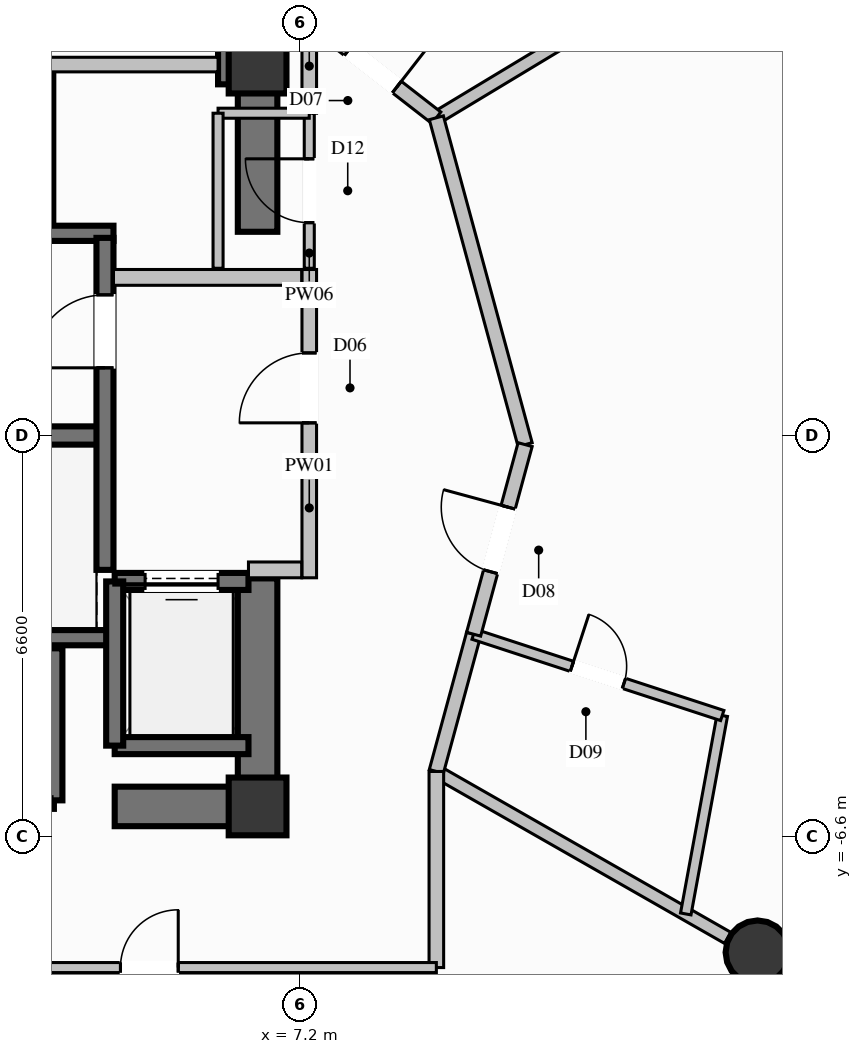
"""IFC4 building model, lengths in metres.
Left out: names, types, materials, properties, quantities, classifications, styles, units other than length and angle.
Written with IfcOpenShell. Run it as: python <this file> out.ifc"""

import sys

from ifc_helpers import new_model, si_unit, direction, frame, frame_2d, origin, origin_2d, place, context, subcontext, project, spatial, rectangle, circle, extrude, element, fill, save


model = new_model("IFC4")
c1 = context("Model", 3, precision=1e-05, world=origin(), true_north=direction((0.0, 1.0)))
c2 = subcontext(c1, "Body", "Model", "MODEL_VIEW")
j1 = project(units=[si_unit("LENGTHUNIT", "METRE"), si_unit("PLANEANGLEUNIT", "RADIAN")], contexts=[c1])
p1 = place(None, origin())
s1 = spatial("IfcSite", under=j1, at=p1, CompositionType="ELEMENT")
p2 = place(p1, origin())
s2 = spatial("IfcBuilding", under=s1, at=p2, CompositionType="ELEMENT")
p3 = place(p2, frame((0.0, 0.0, 149.4)))
s3 = spatial("IfcBuildingStorey", under=s2, at=p3, CompositionType="ELEMENT", Elevation=149.4)
for number, where, z_axis, x_axis in (
    (1, (6.5, -6.1, 0.0), (0.0, 0.0, 1.0), (1.0, 0.0, 0.0)),
    (2, (6.5, 6.1, 0.0), (0.0, 0.0, 1.0), (1.0, 0.0, 0.0)),
):
    element("IfcColumn", number, at=place(p3, frame(where, z_axis=z_axis, x_axis=x_axis)), inside=s3, PredefinedType="COLUMN", context=c2, shape_type="SweptSolid", body=[
        extrude(rectangle(XDim=0.95, YDim=0.95, at=origin_2d()), origin(), (0.0, 0.0, 1.0), 3.6),
    ])
p4 = place(p3, frame((-3.99, 0.0, 0.0), z_axis=(0.0, 0.0, 1.0), x_axis=(1.0, 0.0, 0.0)))
e3 = element("IfcWall", 3, at=p4, inside=s3, PredefinedType="SHEAR", context=c2, shape_type="SweptSolid", body=[
    extrude(rectangle(XDim=7.98, YDim=0.3, at=frame_2d((3.99, 0.0))), origin(), (0.0, 0.0, 1.0), 3.6),
])
for number, where, z_axis, x_axis in (
    (4, (-4.13, -3.325, 0.0), (0.0, 0.0, 1.0), (1.0, 0.0, 0.0)),
    (5, (-4.13, 3.325, 0.0), (0.0, 0.0, 1.0), (1.0, 0.0, 0.0)),
):
    element("IfcWall", number, at=place(p3, frame(where, z_axis=z_axis, x_axis=x_axis)), inside=s3, PredefinedType="SOLIDWALL", context=c2, shape_type="SweptSolid", body=[
        extrude(rectangle(XDim=8.26, YDim=0.25, at=frame_2d((4.13, 0.0))), origin(), (0.0, 0.0, 1.0), 3.6),
    ])
p5 = place(p3, frame((4.15, -6.1, 0.0), z_axis=(0.0, 0.0, 1.0), x_axis=(1.0, 0.0, 0.0)))
e6 = element("IfcWall", 6, at=p5, inside=s3, PredefinedType="SHEAR", context=c2, shape_type="SweptSolid", body=[
    extrude(rectangle(XDim=2.025, YDim=0.65, at=frame_2d((1.013, 0.0))), origin(), (0.0, 0.0, 1.0), 3.6),
])
p6 = place(p3, frame((5.85, 6.1, 0.0), z_axis=(0.0, 0.0, 1.0), x_axis=(1.0, 0.0, 0.0)))
e7 = element("IfcWall", 7, at=p6, inside=s3, PredefinedType="SHEAR", context=c2, shape_type="SweptSolid", body=[
    extrude(rectangle(XDim=0.325, YDim=0.65, at=frame_2d((0.163, 0.0))), origin(), (0.0, 0.0, 1.0), 3.6),
])
p7 = place(p3, frame((6.5, -6.425, 0.0), z_axis=(0.0, 0.0, 1.0), x_axis=(0.0, 1.0, 0.0)))
e8 = element("IfcWall", 8, at=p7, inside=s3, PredefinedType="SHEAR", context=c2, shape_type="SweptSolid", body=[
    extrude(rectangle(XDim=4.075, YDim=0.65, at=frame_2d((2.038, 0.0))), origin(), (0.0, 0.0, 1.0), 3.6),
])
p8 = place(p3, frame((6.5, 3.35, 0.0), z_axis=(0.0, 0.0, 1.0), x_axis=(0.0, 1.0, 0.0)))
e9 = element("IfcWall", 9, at=p8, inside=s3, PredefinedType="SHEAR", context=c2, shape_type="SweptSolid", body=[
    extrude(rectangle(XDim=3.075, YDim=0.65, at=frame_2d((1.538, 0.0))), origin(), (0.0, 0.0, 1.0), 3.6),
])
p9 = place(p3, frame((14.722, -8.5, 0.0), z_axis=(0.0, 0.0, 1.0), x_axis=(1.0, 0.0, 0.0)))
e10 = element("IfcColumn", 10, at=p9, inside=s3, PredefinedType="COLUMN", context=c2, shape_type="SweptSolid", body=[
    extrude(circle(Radius=0.525, at=origin_2d()), origin(), (0.0, 0.0, 1.0), 3.6),
])
p10 = place(p3, frame((1.05, -6.0, 0.0), z_axis=(0.0, 0.0, 1.0), x_axis=(1.0, 0.0, 0.0)))
e11 = element("IfcWall", 11, at=p10, inside=s3, PredefinedType="SOLIDWALL", context=c2, shape_type="SweptSolid", body=[
    extrude(rectangle(XDim=2.1, YDim=0.28, at=frame_2d((1.05, 0.0))), origin(), (0.0, 0.0, 1.0), 3.35),
])
p11 = place(p10, frame((0.5, 0.0, 0.0)))
e12 = element("IfcOpeningElement", 12, at=p11, cuts=e11, PredefinedType="OPENING", context=c2, shape_type="SweptSolid", body=[
    extrude(rectangle(XDim=1.1, YDim=2.2, at=frame_2d((0.55, 1.1))), frame((0.0, 0.15, 0.0), z_axis=(0.0, -1.0, 0.0), x_axis=(1.0, 0.0, 0.0)), (0.0, 0.0, 1.0), 0.3),
])
for number, where, z_axis, x_axis in (
    (13, (3.15, -6.0, 0.0), (0.0, 0.0, 1.0), (0.0, 1.0, 0.0)),
    (14, (3.0, 3.5, 0.0), (0.0, 0.0, 1.0), (0.0, 1.0, 0.0)),
):
    element("IfcWall", number, at=place(p3, frame(where, z_axis=z_axis, x_axis=x_axis)), inside=s3, PredefinedType="SOLIDWALL", context=c2, shape_type="SweptSolid", body=[
        extrude(rectangle(XDim=2.5, YDim=0.28, at=frame_2d((1.25, 0.0))), origin(), (0.0, 0.0, 1.0), 3.35),
    ])
p12 = place(p3, frame((4.15, -5.1, 0.0), z_axis=(0.0, 0.0, 1.0), x_axis=(1.0, 0.0, 0.0)))
e15 = element("IfcWall", 15, at=p12, inside=s3, PredefinedType="SOLIDWALL", context=c2, shape_type="SweptSolid", body=[
    extrude(rectangle(XDim=2.2, YDim=0.28, at=frame_2d((1.1, 0.0))), origin(), (0.0, 0.0, 1.0), 3.35),
])
p13 = place(p3, frame((6.35, -2.4, 0.0), z_axis=(0.0, 0.0, 1.0), x_axis=(-1.0, 0.0, 0.0)))
e16 = element("IfcWall", 16, at=p13, inside=s3, PredefinedType="SOLIDWALL", context=c2, shape_type="SweptSolid", body=[
    extrude(rectangle(XDim=2.2, YDim=0.28, at=frame_2d((1.1, 0.0))), origin(), (0.0, 0.0, 1.0), 3.35),
])
p14 = place(p13, frame((0.5, 0.0, 0.0)))
e17 = element("IfcOpeningElement", 17, at=p14, cuts=e16, PredefinedType="OPENING", context=c2, shape_type="SweptSolid", body=[
    extrude(rectangle(XDim=1.2, YDim=2.2, at=frame_2d((0.6, 1.1))), frame((0.0, 0.15, 0.0), z_axis=(0.0, -1.0, 0.0), x_axis=(1.0, 0.0, 0.0)), (0.0, 0.0, 1.0), 0.3),
])
p15 = place(p3, frame((4.15, -2.4, 0.0), z_axis=(0.0, 0.0, 1.0), x_axis=(0.0, -1.0, 0.0)))
e18 = element("IfcWall", 18, at=p15, inside=s3, PredefinedType="SOLIDWALL", context=c2, shape_type="SweptSolid", body=[
    extrude(rectangle(XDim=2.7, YDim=0.28, at=frame_2d((1.35, 0.0))), origin(), (0.0, 0.0, 1.0), 3.35),
])
p16 = place(p3, frame((3.99, -2.21, 0.0), z_axis=(0.0, 0.0, 1.0), x_axis=(0.0, 1.0, 0.0)))
e19 = element("IfcWall", 19, at=p16, inside=s3, PredefinedType="SOLIDWALL", context=c2, shape_type="SweptSolid", body=[
    extrude(rectangle(XDim=5.46, YDim=0.28, at=frame_2d((2.73, 0.0))), origin(), (0.0, 0.0, 1.0), 3.35),
])
p17 = place(p16, frame((3.323, 0.0, 0.0)))
e20 = element("IfcOpeningElement", 20, at=p17, cuts=e19, PredefinedType="OPENING", context=c2, shape_type="SweptSolid", body=[
    extrude(rectangle(XDim=1.2, YDim=2.2, at=frame_2d((0.6, 1.1))), frame((0.0, 0.15, 0.0), z_axis=(0.0, -1.0, 0.0), x_axis=(1.0, 0.0, 0.0)), (0.0, 0.0, 1.0), 0.3),
])
p18 = place(p3, frame((7.35, -2.34, 0.0), z_axis=(0.0, 0.0, 1.0), x_axis=(0.0, 1.0, 0.0)))
e21 = element("IfcWall", 21, at=p18, inside=s3, PredefinedType="PARTITIONING", context=c2, shape_type="SweptSolid", body=[
    extrude(rectangle(XDim=5.07, YDim=0.24, at=frame_2d((2.535, 0.0))), origin(), (0.0, 0.0, 1.0), 2.435),
])
p19 = place(p18, frame((2.548, 0.0, 0.0)))
e22 = element("IfcOpeningElement", 22, at=p19, cuts=e21, PredefinedType="OPENING", context=c2, shape_type="SweptSolid", body=[
    extrude(rectangle(XDim=1.15, YDim=2.2, at=frame_2d((0.575, 1.1))), frame((0.0, 0.13, 0.0), z_axis=(0.0, -1.0, 0.0), x_axis=(1.0, 0.0, 0.0)), (0.0, 0.0, 1.0), 0.26),
])
p20 = place(p3, frame((6.35, -2.21, 0.0), z_axis=(0.0, 0.0, 1.0), x_axis=(1.0, 0.0, 0.0)))
e23 = element("IfcWall", 23, at=p20, inside=s3, PredefinedType="PARTITIONING", context=c2, shape_type="SweptSolid", body=[
    extrude(rectangle(XDim=0.875, YDim=0.26, at=frame_2d((0.438, 0.0))), origin(), (0.0, 0.0, 1.0), 3.35),
])
p21 = place(p3, frame((4.13, 2.6, 0.0), z_axis=(0.0, 0.0, 1.0), x_axis=(1.0, 0.0, 0.0)))
e24 = element("IfcWall", 24, at=p21, inside=s3, PredefinedType="PARTITIONING", context=c2, shape_type="SweptSolid", body=[
    extrude(rectangle(XDim=3.095, YDim=0.26, at=frame_2d((1.548, 0.0))), origin(), (0.0, 0.0, 1.0), 3.35),
])
p22 = place(p3, frame((7.35, 5.3, 0.0), z_axis=(0.0, 0.0, 1.0), x_axis=(0.0, 1.0, 0.0)))
e25 = element("IfcWall", 25, at=p22, inside=s3, PredefinedType="PARTITIONING", context=c2, shape_type="SweptSolid", body=[
    extrude(rectangle(XDim=1.55, YDim=0.24, at=frame_2d((0.775, 0.0))), origin(), (0.0, 0.0, 1.0), 2.435),
])
p23 = place(p3, frame((3.0, 6.1, 0.0), z_axis=(0.0, 0.0, 1.0), x_axis=(1.0, 0.0, 0.0)))
e26 = element("IfcWall", 26, at=p23, inside=s3, PredefinedType="PARTITIONING", context=c2, shape_type="SweptSolid", body=[
    extrude(rectangle(XDim=2.85, YDim=0.24, at=frame_2d((1.425, 0.0))), origin(), (0.0, 0.0, 1.0), 2.435),
])
p24 = place(p3, frame((7.35, 2.75, 0.0), z_axis=(0.0, 0.0, 1.0), x_axis=(0.0, 1.0, 0.0)))
e27 = element("IfcWall", 27, at=p24, inside=s3, PredefinedType="PARTITIONING", context=c2, shape_type="SweptSolid", body=[
    extrude(rectangle(XDim=2.55, YDim=0.165, at=frame_2d((1.275, 0.0))), origin(), (0.0, 0.0, 1.0), 3.35),
])
p25 = place(p24, frame((0.75, 0.0, 0.0)))
e28 = element("IfcOpeningElement", 28, at=p25, cuts=e27, PredefinedType="OPENING", context=c2, shape_type="SweptSolid", body=[
    extrude(rectangle(XDim=1.05, YDim=2.15, at=frame_2d((0.525, 1.075))), frame((0.0, 0.093, 0.0), z_axis=(0.0, -1.0, 0.0), x_axis=(1.0, 0.0, 0.0)), (0.0, 0.0, 1.0), 0.185),
])
p26 = place(p3, frame((7.35, 5.3, 0.0), z_axis=(0.0, 0.0, 1.0), x_axis=(-1.0, 0.0, 0.0)))
e29 = element("IfcWall", 29, at=p26, inside=s3, PredefinedType="PARTITIONING", context=c2, shape_type="SweptSolid", body=[
    extrude(rectangle(XDim=1.5, YDim=0.165, at=frame_2d((0.75, 0.0))), origin(), (0.0, 0.0, 1.0), 2.435),
])
p27 = place(p3, frame((5.85, 5.3, 0.0), z_axis=(0.0, 0.0, 1.0), x_axis=(0.0, -1.0, 0.0)))
e30 = element("IfcWall", 30, at=p27, inside=s3, PredefinedType="PARTITIONING", context=c2, shape_type="SweptSolid", body=[
    extrude(rectangle(XDim=2.55, YDim=0.165, at=frame_2d((1.275, 0.0))), origin(), (0.0, 0.0, 1.0), 2.435),
])
p28 = place(p3, frame((9.44, 5.225, 0.0), z_axis=(0.0, 0.0, 1.0), x_axis=(0.856412995276, 0.516291372698, 0.0)))
e31 = element("IfcWall", 31, at=p28, inside=s3, PredefinedType="PARTITIONING", context=c2, shape_type="SweptSolid", body=[
    extrude(rectangle(XDim=5.675, YDim=0.21, at=frame_2d((2.837, 0.0))), origin(), (0.0, 0.0, 1.0), 2.717),
])
p29 = place(p3, frame((9.44, -5.525, 0.0), z_axis=(0.0, 0.0, 1.0), x_axis=(0.868338411793, -0.495972179265, 0.0)))
e32 = element("IfcWall", 32, at=p29, inside=s3, PredefinedType="PARTITIONING", context=c2, shape_type="SweptSolid", body=[
    extrude(rectangle(XDim=5.519, YDim=0.21, at=frame_2d((2.759, 0.0))), origin(), (0.0, 0.0, 1.0), 2.717),
])
p30 = place(p3, frame((15.176, -8.801, 0.0), z_axis=(0.0, 0.0, 1.0), x_axis=(0.868298798987, -0.496041526162, 0.0)))
e33 = element("IfcWall", 33, at=p30, inside=s3, PredefinedType="PARTITIONING", context=c2, shape_type="SweptSolid", body=[
    extrude(rectangle(XDim=7.288, YDim=0.21, at=frame_2d((3.644, 0.0))), origin(), (0.0, 0.0, 1.0), 3.35),
])
p31 = place(p3, frame((7.35, 6.85, 0.0), z_axis=(0.0, 0.0, 1.0), x_axis=(0.789431664708, -0.613838453306, 0.0)))
e34 = element("IfcWall", 34, at=p31, inside=s3, PredefinedType="PARTITIONING", context=c2, shape_type="SweptSolid", body=[
    extrude(rectangle(XDim=2.647, YDim=0.24, at=frame_2d((1.324, 0.0))), origin(), (0.0, 0.0, 1.0), 3.35),
])
p32 = place(p31, frame((0.824, 0.0, 0.0)))
e35 = element("IfcOpeningElement", 35, at=p32, cuts=e34, PredefinedType="OPENING", context=c2, shape_type="SweptSolid", body=[
    extrude(rectangle(XDim=1.0, YDim=2.2, at=frame_2d((0.5, 1.1))), frame((0.0, 0.13, 0.0), z_axis=(0.0, -1.0, 0.0), x_axis=(1.0, 0.0, 0.0)), (0.0, 0.0, 1.0), 0.26),
])
p33 = place(p3, frame((9.44, -5.525, 0.0), z_axis=(0.0, 0.0, 1.0), x_axis=(0.262136756532, 0.965030735715, 0.0)))
e36 = element("IfcWall", 36, at=p33, inside=s3, PredefinedType="PARTITIONING", context=c2, shape_type="SweptSolid", body=[
    extrude(rectangle(XDim=2.339, YDim=0.24, at=frame_2d((1.169, 0.0))), origin(), (0.0, 0.0, 1.0), 3.35),
])
p34 = place(p3, frame((13.542, -7.868, 0.0), z_axis=(0.0, 0.0, 1.0), x_axis=(0.180879603069, 0.983505246144, 0.0)))
e37 = element("IfcWall", 37, at=p34, inside=s3, PredefinedType="PLUMBINGWALL", context=c2, shape_type="SweptSolid", body=[
    extrude(rectangle(XDim=3.318, YDim=0.175, at=frame_2d((1.659, 0.0))), origin(), (0.0, 0.0, 1.0), 3.35),
])
p35 = place(p3, frame((10.053, -3.268, 0.0), z_axis=(0.0, 0.0, 1.0), x_axis=(0.950489200724, -0.310757589299, 0.0)))
e38 = element("IfcWall", 38, at=p35, inside=s3, PredefinedType="PLUMBINGWALL", context=c2, shape_type="SweptSolid", body=[
    extrude(rectangle(XDim=4.302, YDim=0.175, at=frame_2d((2.151, 0.0))), origin(), (0.0, 0.0, 1.0), 3.35),
])
p36 = place(p35, frame((1.701, 0.0, 0.0)))
e39 = element("IfcOpeningElement", 39, at=p36, cuts=e38, PredefinedType="OPENING", context=c2, shape_type="SweptSolid", body=[
    extrude(rectangle(XDim=0.9, YDim=2.1, at=frame_2d((0.45, 1.05))), frame((0.0, 0.098, 0.0), z_axis=(0.0, -1.0, 0.0), x_axis=(1.0, 0.0, 0.0)), (0.0, 0.0, 1.0), 0.195),
])
p37 = place(p3, frame((10.9, -0.15, 0.0), z_axis=(0.0, 0.0, 1.0), x_axis=(-0.262123261283, 0.965034401405, 0.0)))
e40 = element("IfcWall", 40, at=p37, inside=s3, PredefinedType="PARTITIONING", context=c2, shape_type="SweptSolid", body=[
    extrude(rectangle(XDim=5.57, YDim=0.24, at=frame_2d((2.785, 0.0))), origin(), (0.0, 0.0, 1.0), 3.35),
])
p38 = place(p3, frame((10.053, -3.268, 0.0), z_axis=(0.0, 0.0, 1.0), x_axis=(0.26211349372, 0.965037054423, 0.0)))
e41 = element("IfcWall", 41, at=p38, inside=s3, PredefinedType="PARTITIONING", context=c2, shape_type="SweptSolid", body=[
    extrude(rectangle(XDim=3.231, YDim=0.24, at=frame_2d((1.616, 0.0))), origin(), (0.0, 0.0, 1.0), 3.35),
])
p39 = place(p38, frame((1.065, 0.0, 0.0)))
e42 = element("IfcOpeningElement", 42, at=p39, cuts=e41, PredefinedType="OPENING", context=c2, shape_type="SweptSolid", body=[
    extrude(rectangle(XDim=1.1, YDim=2.3, at=frame_2d((0.55, 1.15))), frame((0.0, 0.13, 0.0), z_axis=(0.0, -1.0, 0.0), x_axis=(1.0, 0.0, 0.0)), (0.0, 0.0, 1.0), 0.26),
])
p40 = place(p3, frame((9.44, -8.75, 0.0), z_axis=(0.0, 0.0, 1.0), x_axis=(0.0, 1.0, 0.0)))
e43 = element("IfcWall", 43, at=p40, inside=s3, PredefinedType="PARTITIONING", context=c2, shape_type="SweptSolid", body=[
    extrude(rectangle(XDim=3.225, YDim=0.24, at=frame_2d((1.613, 0.0))), origin(), (0.0, 0.0, 1.0), 3.35),
])
p41 = place(p3, frame((0.0, -8.75, 0.0), z_axis=(0.0, 0.0, 1.0), x_axis=(1.0, 0.0, 0.0)))
e44 = element("IfcWall", 44, at=p41, inside=s3, PredefinedType="PARTITIONING", context=c2, shape_type="SweptSolid", body=[
    extrude(rectangle(XDim=9.44, YDim=0.165, at=frame_2d((4.72, 0.0))), origin(), (0.0, 0.0, 1.0), 3.35),
])
p42 = place(p41, frame((4.245, 0.0, 0.0)))
e45 = element("IfcOpeningElement", 45, at=p42, cuts=e44, PredefinedType="OPENING", context=c2, shape_type="SweptSolid", body=[
    extrude(rectangle(XDim=0.95, YDim=2.1, at=frame_2d((0.475, 1.05))), frame((0.0, 0.093, 0.0), z_axis=(0.0, -1.0, 0.0), x_axis=(1.0, 0.0, 0.0)), (0.0, 0.0, 1.0), 0.185),
])
p43 = place(p14, origin())
e46 = element("IfcDoor", 46, at=p43, inside=s3, OperationType="SLIDING_TO_LEFT", PredefinedType="DOOR", context=c2, shape_type="SweptSolid", body=[
    extrude(rectangle(XDim=1.2, YDim=2.2, at=frame_2d((0.6, 1.1))), frame((0.0, 0.025, 0.0), z_axis=(0.0, -1.0, 0.0), x_axis=(1.0, 0.0, 0.0)), (0.0, 0.0, 1.0), 0.05),
])
fill(e17, e46)
p44 = place(p17, origin())
e47 = element("IfcDoor", 47, at=p44, inside=s3, OperationType="SINGLE_SWING_LEFT", PredefinedType="DOOR", context=c2, shape_type="SweptSolid", body=[
    extrude(rectangle(XDim=1.2, YDim=2.2, at=frame_2d((0.6, 1.1))), frame((0.0, 0.025, 0.0), z_axis=(0.0, -1.0, 0.0), x_axis=(1.0, 0.0, 0.0)), (0.0, 0.0, 1.0), 0.05),
])
fill(e20, e47)
p45 = place(p19, origin())
e48 = element("IfcDoor", 48, at=p45, inside=s3, OperationType="SINGLE_SWING_LEFT", PredefinedType="DOOR", context=c2, shape_type="SweptSolid", body=[
    extrude(rectangle(XDim=1.15, YDim=2.2, at=frame_2d((0.575, 1.1))), frame((0.0, 0.025, 0.0), z_axis=(0.0, -1.0, 0.0), x_axis=(1.0, 0.0, 0.0)), (0.0, 0.0, 1.0), 0.05),
])
fill(e22, e48)
p46 = place(p25, origin())
e49 = element("IfcDoor", 49, at=p46, inside=s3, OperationType="SINGLE_SWING_RIGHT", PredefinedType="DOOR", context=c2, shape_type="SweptSolid", body=[
    extrude(rectangle(XDim=1.05, YDim=2.15, at=frame_2d((0.525, 1.075))), frame((0.0, 0.025, 0.0), z_axis=(0.0, -1.0, 0.0), x_axis=(1.0, 0.0, 0.0)), (0.0, 0.0, 1.0), 0.05),
])
fill(e28, e49)
p47 = place(p32, origin())
e50 = element("IfcDoor", 50, at=p47, inside=s3, OperationType="SINGLE_SWING_RIGHT", PredefinedType="DOOR", context=c2, shape_type="SweptSolid", body=[
    extrude(rectangle(XDim=1.0, YDim=2.2, at=frame_2d((0.5, 1.1))), frame((0.0, 0.025, 0.0), z_axis=(0.0, -1.0, 0.0), x_axis=(1.0, 0.0, 0.0)), (0.0, 0.0, 1.0), 0.05),
])
fill(e35, e50)
p48 = place(p36, origin())
e51 = element("IfcDoor", 51, at=p48, inside=s3, OperationType="SINGLE_SWING_LEFT", PredefinedType="DOOR", context=c2, shape_type="SweptSolid", body=[
    extrude(rectangle(XDim=0.9, YDim=2.1, at=frame_2d((0.45, 1.05))), frame((0.0, 0.025, 0.0), z_axis=(0.0, -1.0, 0.0), x_axis=(1.0, 0.0, 0.0)), (0.0, 0.0, 1.0), 0.05),
])
fill(e39, e51)
p49 = place(p39, origin())
e52 = element("IfcDoor", 52, at=p49, inside=s3, OperationType="SINGLE_SWING_RIGHT", PredefinedType="DOOR", context=c2, shape_type="SweptSolid", body=[
    extrude(rectangle(XDim=1.1, YDim=2.3, at=frame_2d((0.55, 1.15))), frame((0.0, 0.025, 0.0), z_axis=(0.0, -1.0, 0.0), x_axis=(1.0, 0.0, 0.0)), (0.0, 0.0, 1.0), 0.05),
])
fill(e42, e52)
p50 = place(p42, origin())
e53 = element("IfcDoor", 53, at=p50, inside=s3, OperationType="SINGLE_SWING_RIGHT", PredefinedType="DOOR", context=c2, shape_type="SweptSolid", body=[
    extrude(rectangle(XDim=0.95, YDim=2.1, at=frame_2d((0.475, 1.05))), frame((0.0, 0.025, 0.0), z_axis=(0.0, -1.0, 0.0), x_axis=(1.0, 0.0, 0.0)), (0.0, 0.0, 1.0), 0.05),
])
fill(e45, e53)
save(model, sys.argv[1])
